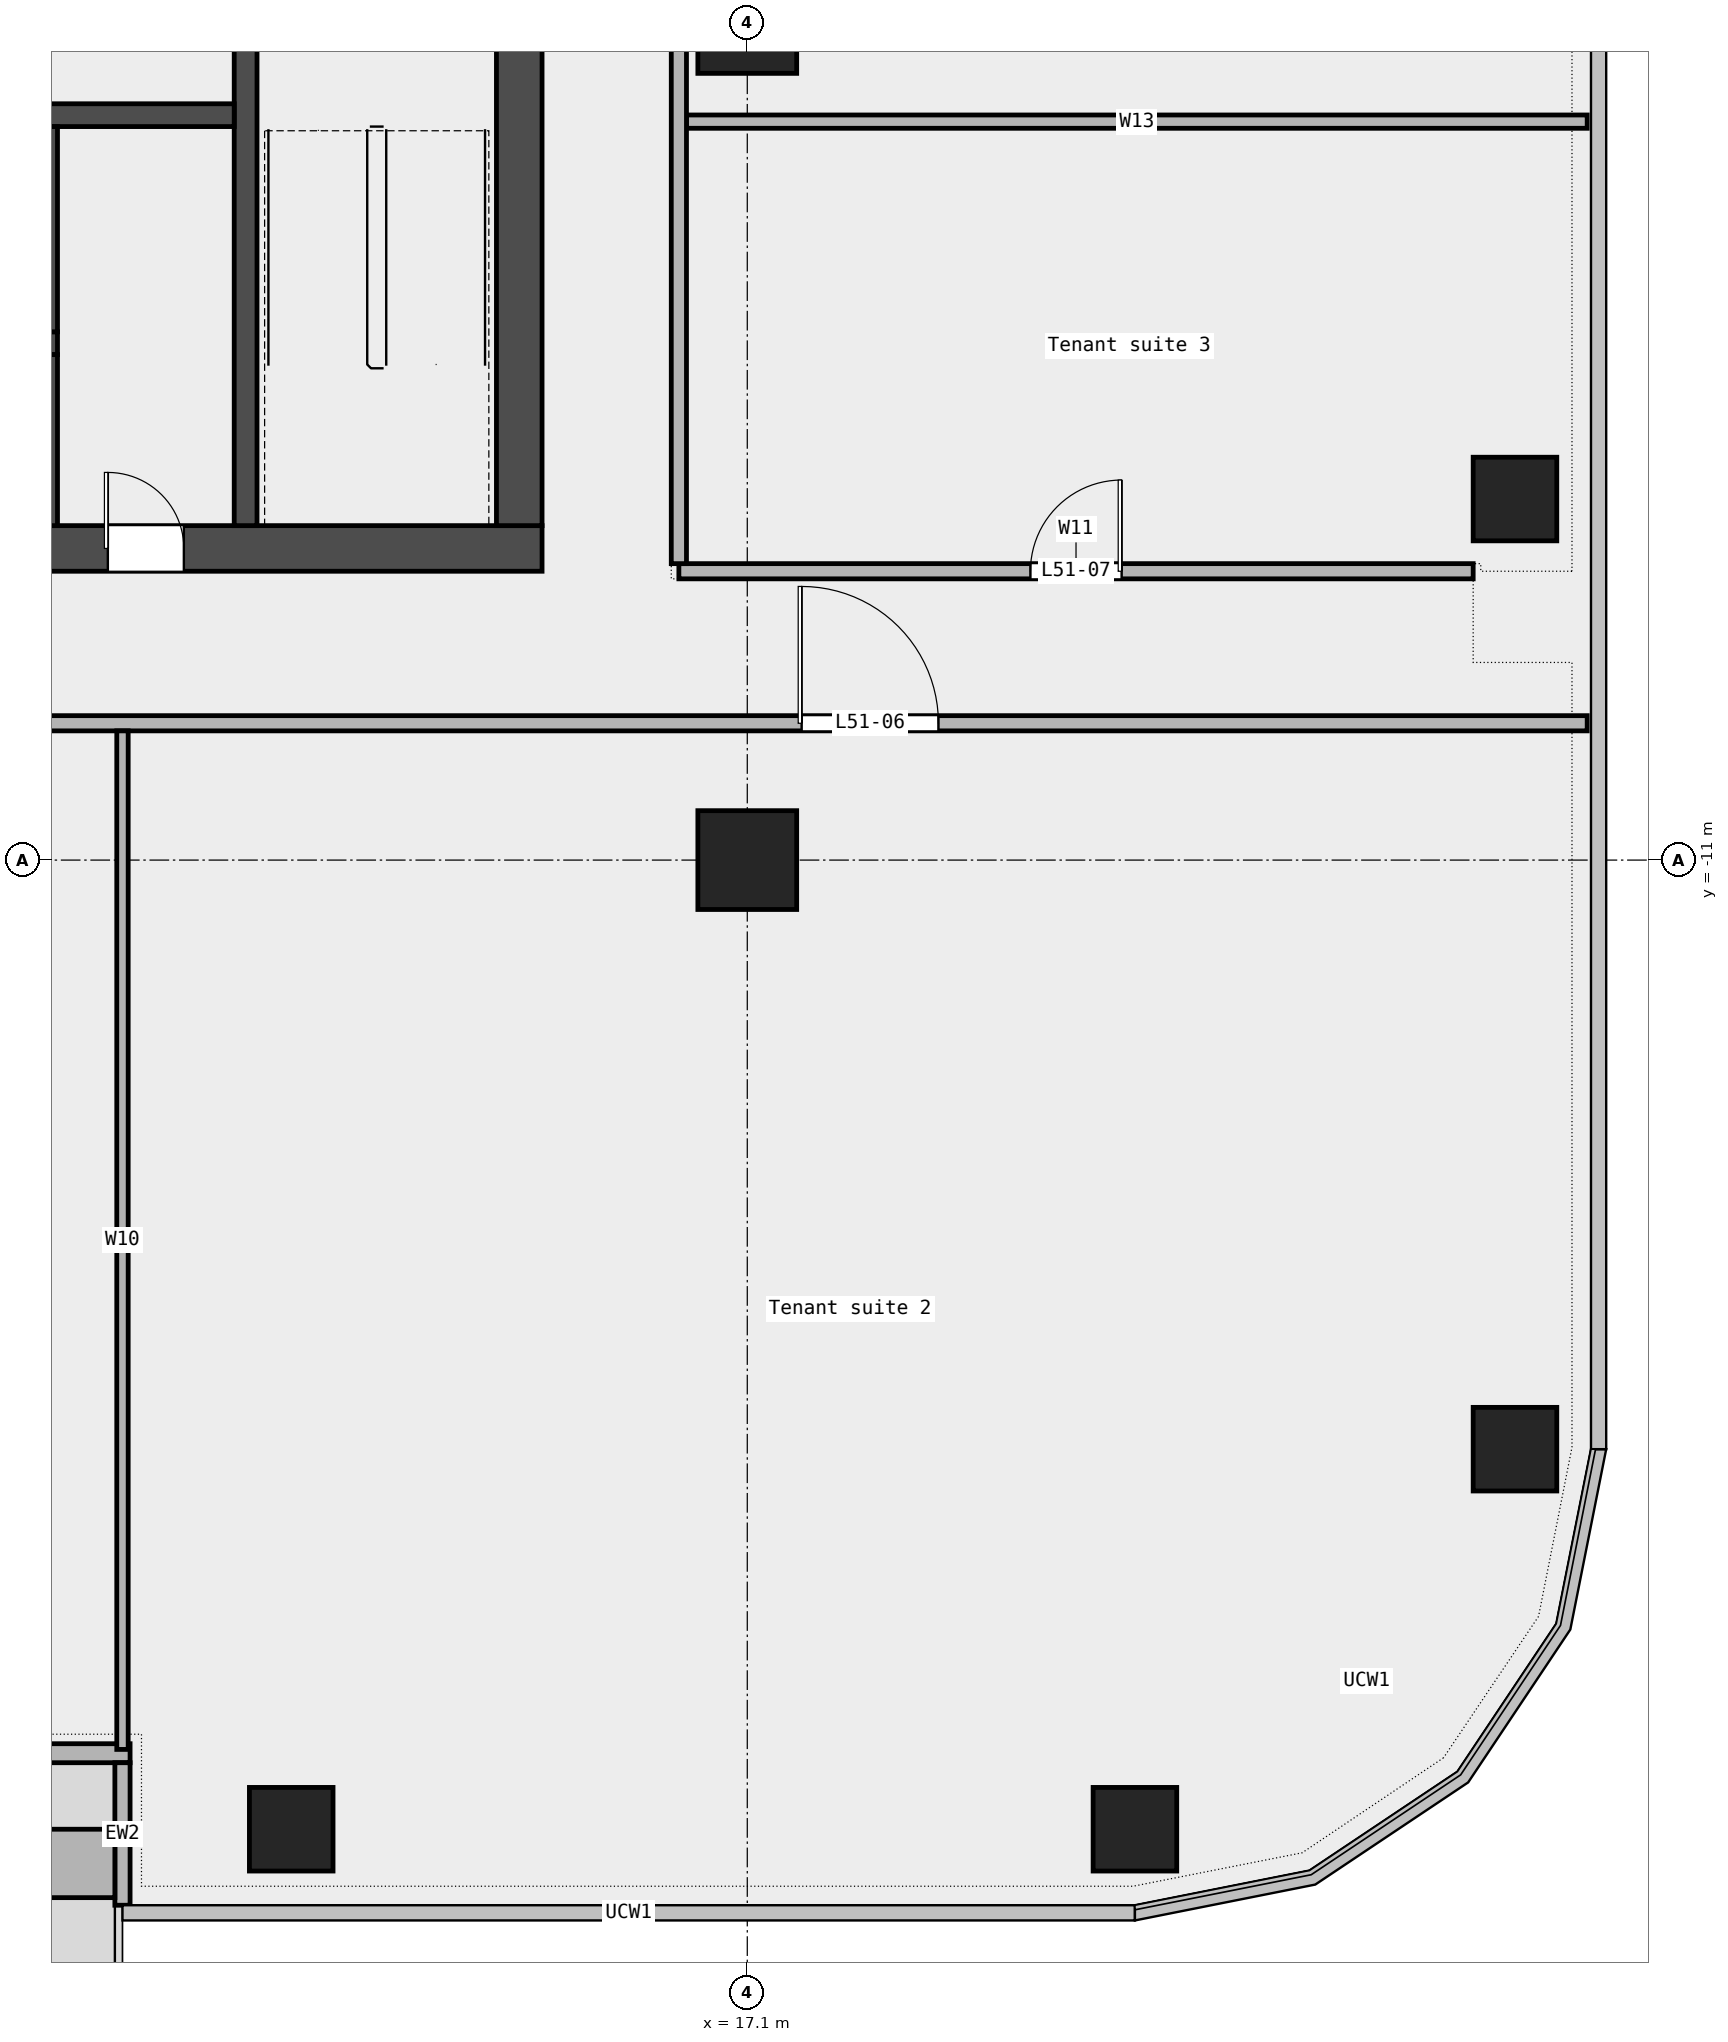
"""IFC4 building model, lengths in metres.
Left out: names, types, materials, properties, quantities, classifications, styles, units other than length and angle.
Written with IfcOpenShell. Run it as: python <this file> out.ifc"""

import sys

from ifc_helpers import new_model, si_unit, direction, frame, frame_2d, origin, origin_2d, place, context, subcontext, project, spatial, rectangle, extrude, element, fill, save


model = new_model("IFC4")
c1 = context("Model", 3, precision=1e-05, world=origin(), true_north=direction((0.0, 1.0)))
c2 = subcontext(c1, "Body", "Model", "MODEL_VIEW")
j1 = project(units=[si_unit("LENGTHUNIT", "METRE"), si_unit("PLANEANGLEUNIT", "RADIAN")], contexts=[c1])
p1 = place(None, origin())
s1 = spatial("IfcSite", under=j1, at=p1, CompositionType="ELEMENT")
p2 = place(p1, origin())
s2 = spatial("IfcBuilding", under=s1, at=p2, CompositionType="ELEMENT")
p3 = place(p2, frame((0.0, 0.0, 239.0)))
s3 = spatial("IfcBuildingStorey", under=s2, at=p3, CompositionType="ELEMENT", Elevation=239.0)
for number, where, z_axis, x_axis in (
    (1, (11.1, -23.75, 0.0), (0.0, 0.0, 1.0), (1.0, 0.0, 0.0)),
    (2, (22.2, -23.75, 0.0), (0.0, 0.0, 1.0), (1.0, 0.0, 0.0)),
    (3, (27.2, -18.75, 0.0), (0.0, 0.0, 1.0), (1.0, 0.0, 0.0)),
    (4, (27.2, -6.25, 0.0), (0.0, 0.0, 1.0), (1.0, 0.0, 0.0)),
):
    element("IfcColumn", number, at=place(p3, frame(where, z_axis=z_axis, x_axis=x_axis)), inside=s3, PredefinedType="COLUMN", context=c2, shape_type="SweptSolid", body=[
        extrude(rectangle(XDim=1.1, YDim=1.1, at=origin_2d()), origin(), (0.0, 0.0, 1.0), 3.6),
    ])
for number, where, z_axis, x_axis in (
    (5, (17.1, -11.0, 0.0), (0.0, 0.0, 1.0), (1.0, 0.0, 0.0)),
    (6, (17.1, 0.0, 0.0), (0.0, 0.0, 1.0), (1.0, 0.0, 0.0)),
):
    element("IfcColumn", number, at=place(p3, frame(where, z_axis=z_axis, x_axis=x_axis)), inside=s3, PredefinedType="COLUMN", context=c2, shape_type="SweptSolid", body=[
        extrude(rectangle(XDim=1.3, YDim=1.3, at=origin_2d()), origin(), (0.0, 0.0, 1.0), 3.6),
    ])
p4 = place(p3, frame((-4.54, -22.75, 0.0), z_axis=(0.0, 0.0, 1.0), x_axis=(1.0, 0.0, 0.0)))
e7 = element("IfcWall", 7, at=p4, inside=s3, PredefinedType="STANDARD", context=c2, shape_type="SweptSolid", body=[
    extrude(rectangle(XDim=13.52, YDim=0.25, at=frame_2d((6.76, 0.0))), origin(), (0.0, 0.0, 1.0), 3.6),
])
p5 = place(p4, frame((1.5, 0.0, 0.45)))
e8 = element("IfcOpeningElement", 8, at=p5, cuts=e7, PredefinedType="OPENING", context=c2, shape_type="SweptSolid", body=[
    extrude(rectangle(XDim=1.5, YDim=2.4, at=frame_2d((0.75, 1.2))), frame((0.0, 0.137, 0.0), z_axis=(0.0, -1.0, 0.0), x_axis=(1.0, 0.0, 0.0)), (0.0, 0.0, 1.0), 0.274),
])
p6 = place(p4, frame((5.75, 0.0, 0.0)))
e9 = element("IfcOpeningElement", 9, at=p6, cuts=e7, PredefinedType="OPENING", context=c2, shape_type="SweptSolid", body=[
    extrude(rectangle(XDim=1.8, YDim=2.4, at=frame_2d((0.9, 1.2))), frame((0.0, 0.137, 0.0), z_axis=(0.0, -1.0, 0.0), x_axis=(1.0, 0.0, 0.0)), (0.0, 0.0, 1.0), 0.274),
])
p7 = place(p4, frame((10.5, 0.0, 0.45)))
e10 = element("IfcOpeningElement", 10, at=p7, cuts=e7, PredefinedType="OPENING", context=c2, shape_type="SweptSolid", body=[
    extrude(rectangle(XDim=1.5, YDim=2.4, at=frame_2d((0.75, 1.2))), frame((0.0, 0.137, 0.0), z_axis=(0.0, -1.0, 0.0), x_axis=(1.0, 0.0, 0.0)), (0.0, 0.0, 1.0), 0.274),
])
p8 = place(p3, frame((8.88, -24.75, 0.0), z_axis=(0.0, 0.0, 1.0), x_axis=(0.0, 1.0, 0.0)))
e11 = element("IfcWall", 11, at=p8, inside=s3, PredefinedType="STANDARD", context=c2, shape_type="SweptSolid", body=[
    extrude(rectangle(XDim=1.875, YDim=0.2, at=frame_2d((0.938, 0.0))), origin(), (0.0, 0.0, 1.0), 3.6),
])
p9 = place(p3, frame((5.18, -24.2, 0.0), z_axis=(0.0, 0.0, 1.0), x_axis=(1.0, 0.0, 0.0)))
e12 = element("IfcWall", 12, at=p9, inside=s3, PredefinedType="STANDARD", context=c2, shape_type="SweptSolid", body=[
    extrude(rectangle(XDim=3.6, YDim=0.9, at=frame_2d((1.8, 0.0))), origin(), (0.0, 0.0, 1.0), 0.7),
])
p10 = place(p3, frame((-28.15, -9.2, 0.0), z_axis=(0.0, 0.0, 1.0), x_axis=(1.0, 0.0, 0.0)))
e13 = element("IfcWall", 13, at=p10, inside=s3, PredefinedType="PARTITIONING", context=c2, shape_type="SweptSolid", body=[
    extrude(rectangle(XDim=56.3, YDim=0.2, at=frame_2d((28.15, 0.0))), origin(), (0.0, 0.0, 1.0), 3.6),
])
p11 = place(p10, frame((29.47, 0.0, 0.0)))
e14 = element("IfcOpeningElement", 14, at=p11, cuts=e13, PredefinedType="OPENING", context=c2, shape_type="SweptSolid", body=[
    extrude(rectangle(XDim=1.8, YDim=2.1, at=frame_2d((0.9, 1.05))), frame((0.0, 0.112, 0.0), z_axis=(0.0, -1.0, 0.0), x_axis=(1.0, 0.0, 0.0)), (0.0, 0.0, 1.0), 0.224),
])
p12 = place(p10, frame((45.965, 0.0, 0.0)))
e15 = element("IfcOpeningElement", 15, at=p12, cuts=e13, PredefinedType="OPENING", context=c2, shape_type="SweptSolid", body=[
    extrude(rectangle(XDim=1.8, YDim=2.1, at=frame_2d((0.9, 1.05))), frame((0.0, 0.112, 0.0), z_axis=(0.0, -1.0, 0.0), x_axis=(1.0, 0.0, 0.0)), (0.0, 0.0, 1.0), 0.224),
])
p13 = place(p10, frame((11.955, 0.0, 0.0)))
e16 = element("IfcOpeningElement", 16, at=p13, cuts=e13, PredefinedType="OPENING", context=c2, shape_type="SweptSolid", body=[
    extrude(rectangle(XDim=1.8, YDim=2.1, at=frame_2d((0.9, 1.05))), frame((0.0, 0.112, 0.0), z_axis=(0.0, -1.0, 0.0), x_axis=(1.0, 0.0, 0.0)), (0.0, 0.0, 1.0), 0.224),
])
p14 = place(p3, frame((16.2, -7.2, 0.0), z_axis=(0.0, 0.0, 1.0), x_axis=(1.0, 0.0, 0.0)))
e17 = element("IfcWall", 17, at=p14, inside=s3, PredefinedType="PARTITIONING", context=c2, shape_type="SweptSolid", body=[
    extrude(rectangle(XDim=10.45, YDim=0.2, at=frame_2d((5.225, 0.0))), origin(), (0.0, 0.0, 1.0), 3.6),
])
p15 = place(p14, frame((4.625, 0.0, 0.0)))
e18 = element("IfcOpeningElement", 18, at=p15, cuts=e17, PredefinedType="OPENING", context=c2, shape_type="SweptSolid", body=[
    extrude(rectangle(XDim=1.2, YDim=2.1, at=frame_2d((0.6, 1.05))), frame((0.0, 0.112, 0.0), z_axis=(0.0, -1.0, 0.0), x_axis=(1.0, 0.0, 0.0)), (0.0, 0.0, 1.0), 0.224),
])
p16 = place(p3, frame((16.3, -1.285, 0.0), z_axis=(0.0, 0.0, 1.0), x_axis=(1.0, 0.0, 0.0)))
e19 = element("IfcWall", 19, at=p16, inside=s3, PredefinedType="PARTITIONING", context=c2, shape_type="SweptSolid", body=[
    extrude(rectangle(XDim=11.85, YDim=0.175, at=frame_2d((5.925, 0.0))), origin(), (0.0, 0.0, 1.0), 3.6),
])
p17 = place(p3, frame((8.88, -22.7, 0.0), z_axis=(0.0, 0.0, 1.0), x_axis=(0.0, 1.0, 0.0)))
e20 = element("IfcWall", 20, at=p17, inside=s3, PredefinedType="PARTITIONING", context=c2, shape_type="SweptSolid", body=[
    extrude(rectangle(XDim=13.4, YDim=0.15, at=frame_2d((6.7, 0.0))), origin(), (0.0, 0.0, 1.0), 3.6),
])
p18 = place(p3, frame((16.2, -7.1, 0.0), z_axis=(0.0, 0.0, 1.0), x_axis=(0.0, 1.0, 0.0)))
e21 = element("IfcWall", 21, at=p18, inside=s3, PredefinedType="PARTITIONING", context=c2, shape_type="SweptSolid", body=[
    extrude(rectangle(XDim=20.5, YDim=0.2, at=frame_2d((10.25, 0.0))), origin(), (0.0, 0.0, 1.0), 3.6),
])
p19 = place(p18, frame((12.258, 0.0, 0.0)))
e22 = element("IfcOpeningElement", 22, at=p19, cuts=e21, PredefinedType="OPENING", context=c2, shape_type="SweptSolid", body=[
    extrude(rectangle(XDim=1.8, YDim=2.1, at=frame_2d((0.9, 1.05))), frame((0.0, 0.112, 0.0), z_axis=(0.0, -1.0, 0.0), x_axis=(1.0, 0.0, 0.0)), (0.0, 0.0, 1.0), 0.224),
])
p20 = place(p3, frame((-14.4, -6.9, 0.0), z_axis=(0.0, 0.0, 1.0), x_axis=(1.0, 0.0, 0.0)))
e23 = element("IfcWall", 23, at=p20, inside=s3, PredefinedType="SHEAR", context=c2, shape_type="SweptSolid", body=[
    extrude(rectangle(XDim=28.8, YDim=0.6, at=frame_2d((14.4, 0.0))), origin(), (0.0, 0.0, 1.0), 3.7),
])
p21 = place(p20, frame((4.337, 0.0, 0.0)))
e24 = element("IfcOpeningElement", 24, at=p21, cuts=e23, PredefinedType="OPENING", context=c2, shape_type="SweptSolid", body=[
    extrude(rectangle(XDim=1.0, YDim=2.1, at=frame_2d((0.5, 1.05))), frame((0.0, 0.312, 0.0), z_axis=(0.0, -1.0, 0.0), x_axis=(1.0, 0.0, 0.0)), (0.0, 0.0, 1.0), 0.624),
])
p22 = place(p20, frame((8.55, 0.0, 0.0)))
e25 = element("IfcOpeningElement", 25, at=p22, cuts=e23, PredefinedType="OPENING", context=c2, shape_type="SweptSolid", body=[
    extrude(rectangle(XDim=1.2, YDim=2.1, at=frame_2d((0.6, 1.05))), frame((0.0, 0.312, 0.0), z_axis=(0.0, -1.0, 0.0), x_axis=(1.0, 0.0, 0.0)), (0.0, 0.0, 1.0), 0.624),
])
p23 = place(p20, frame((12.962, 0.0, 0.0)))
e26 = element("IfcOpeningElement", 26, at=p23, cuts=e23, PredefinedType="OPENING", context=c2, shape_type="SweptSolid", body=[
    extrude(rectangle(XDim=1.0, YDim=2.1, at=frame_2d((0.5, 1.05))), frame((0.0, 0.312, 0.0), z_axis=(0.0, -1.0, 0.0), x_axis=(1.0, 0.0, 0.0)), (0.0, 0.0, 1.0), 0.624),
])
p24 = place(p20, frame((15.212, 0.0, 0.0)))
e27 = element("IfcOpeningElement", 27, at=p24, cuts=e23, PredefinedType="OPENING", context=c2, shape_type="SweptSolid", body=[
    extrude(rectangle(XDim=1.0, YDim=2.1, at=frame_2d((0.5, 1.05))), frame((0.0, 0.312, 0.0), z_axis=(0.0, -1.0, 0.0), x_axis=(1.0, 0.0, 0.0)), (0.0, 0.0, 1.0), 0.624),
])
p25 = place(p20, frame((18.75, 0.0, 0.0)))
e28 = element("IfcOpeningElement", 28, at=p25, cuts=e23, PredefinedType="OPENING", context=c2, shape_type="SweptSolid", body=[
    extrude(rectangle(XDim=1.8, YDim=2.1, at=frame_2d((0.9, 1.05))), frame((0.0, 0.312, 0.0), z_axis=(0.0, -1.0, 0.0), x_axis=(1.0, 0.0, 0.0)), (0.0, 0.0, 1.0), 0.624),
])
p26 = place(p20, frame((23.087, 0.0, 0.0)))
e29 = element("IfcOpeningElement", 29, at=p26, cuts=e23, PredefinedType="OPENING", context=c2, shape_type="SweptSolid", body=[
    extrude(rectangle(XDim=1.0, YDim=2.1, at=frame_2d((0.5, 1.05))), frame((0.0, 0.312, 0.0), z_axis=(0.0, -1.0, 0.0), x_axis=(1.0, 0.0, 0.0)), (0.0, 0.0, 1.0), 0.624),
])
p27 = place(p3, frame((14.1, -6.6, 0.0), z_axis=(0.0, 0.0, 1.0), x_axis=(0.0, 1.0, 0.0)))
e30 = element("IfcWall", 30, at=p27, inside=s3, PredefinedType="SHEAR", context=c2, shape_type="SweptSolid", body=[
    extrude(rectangle(XDim=19.5, YDim=0.6, at=frame_2d((9.75, 0.0))), origin(), (0.0, 0.0, 1.0), 3.7),
])
p28 = place(p27, frame((9.3, 0.0, 0.0)))
e31 = element("IfcOpeningElement", 31, at=p28, cuts=e30, PredefinedType="OPENING", context=c2, shape_type="SweptSolid", body=[
    extrude(rectangle(XDim=1.8, YDim=2.1, at=frame_2d((0.9, 1.05))), frame((0.0, 0.312, 0.0), z_axis=(0.0, -1.0, 0.0), x_axis=(1.0, 0.0, 0.0)), (0.0, 0.0, 1.0), 0.624),
])
p29 = place(p3, frame((10.5, -6.6, 0.0), z_axis=(0.0, 0.0, 1.0), x_axis=(0.0, 1.0, 0.0)))
e32 = element("IfcWall", 32, at=p29, inside=s3, PredefinedType="SHEAR", context=c2, shape_type="SweptSolid", body=[
    extrude(rectangle(XDim=8.55, YDim=0.3, at=frame_2d((4.275, 0.0))), origin(), (0.0, 0.0, 1.0), 3.7),
])
p30 = place(p3, frame((-10.35, -1.2, 0.0), z_axis=(0.0, 0.0, 1.0), x_axis=(1.0, 0.0, 0.0)))
e33 = element("IfcWall", 33, at=p30, inside=s3, PredefinedType="SOLIDWALL", context=c2, shape_type="SweptSolid", body=[
    extrude(rectangle(XDim=20.7, YDim=0.3, at=frame_2d((10.35, 0.0))), origin(), (0.0, 0.0, 1.0), 3.7),
])
p31 = place(p3, frame((2.475, -4.2, 0.0), z_axis=(0.0, 0.0, 1.0), x_axis=(1.0, 0.0, 0.0)))
e34 = element("IfcWall", 34, at=p31, inside=s3, PredefinedType="SOLIDWALL", context=c2, shape_type="SweptSolid", body=[
    extrude(rectangle(XDim=5.55, YDim=0.3, at=frame_2d((2.775, 0.0))), origin(), (0.0, 0.0, 1.0), 3.7),
])
p32 = place(p31, frame((0.762, 0.0, 0.0)))
e35 = element("IfcOpeningElement", 35, at=p32, cuts=e34, PredefinedType="OPENING", context=c2, shape_type="SweptSolid", body=[
    extrude(rectangle(XDim=1.4, YDim=2.1, at=frame_2d((0.7, 1.05))), frame((0.0, 0.162, 0.0), z_axis=(0.0, -1.0, 0.0), x_axis=(1.0, 0.0, 0.0)), (0.0, 0.0, 1.0), 0.324),
])
p33 = place(p31, frame((3.387, 0.0, 0.0)))
e36 = element("IfcOpeningElement", 36, at=p33, cuts=e34, PredefinedType="OPENING", context=c2, shape_type="SweptSolid", body=[
    extrude(rectangle(XDim=1.4, YDim=2.1, at=frame_2d((0.7, 1.05))), frame((0.0, 0.162, 0.0), z_axis=(0.0, -1.0, 0.0), x_axis=(1.0, 0.0, 0.0)), (0.0, 0.0, 1.0), 0.324),
])
p34 = place(p3, frame((7.875, -4.05, 0.0), z_axis=(0.0, 0.0, 1.0), x_axis=(0.0, 1.0, 0.0)))
e37 = element("IfcWall", 37, at=p34, inside=s3, PredefinedType="SOLIDWALL", context=c2, shape_type="SweptSolid", body=[
    extrude(rectangle(XDim=2.7, YDim=0.3, at=frame_2d((1.35, 0.0))), origin(), (0.0, 0.0, 1.0), 3.7),
])
p35 = place(p3, frame((7.875, -6.6, 0.0), z_axis=(0.0, 0.0, 1.0), x_axis=(0.0, 1.0, 0.0)))
e38 = element("IfcWall", 38, at=p35, inside=s3, PredefinedType="SOLIDWALL", context=c2, shape_type="SweptSolid", body=[
    extrude(rectangle(XDim=2.25, YDim=0.3, at=frame_2d((1.125, 0.0))), origin(), (0.0, 0.0, 1.0), 3.7),
])
p36 = place(p12, origin())
e39 = element("IfcDoor", 39, at=p36, inside=s3, OperationType="DOUBLE_DOOR_SINGLE_SWING", PredefinedType="DOOR", context=c2, shape_type="SweptSolid", body=[
    extrude(rectangle(XDim=1.8, YDim=2.1, at=frame_2d((0.9, 1.05))), frame((0.0, 0.025, 0.0), z_axis=(0.0, -1.0, 0.0), x_axis=(1.0, 0.0, 0.0)), (0.0, 0.0, 1.0), 0.05),
])
fill(e15, e39)
p37 = place(p15, origin())
e40 = element("IfcDoor", 40, at=p37, inside=s3, OperationType="SINGLE_SWING_RIGHT", PredefinedType="DOOR", context=c2, shape_type="SweptSolid", body=[
    extrude(rectangle(XDim=1.2, YDim=2.1, at=frame_2d((0.6, 1.05))), frame((0.0, 0.025, 0.0), z_axis=(0.0, -1.0, 0.0), x_axis=(1.0, 0.0, 0.0)), (0.0, 0.0, 1.0), 0.05),
])
fill(e18, e40)
p38 = place(p26, origin())
e41 = element("IfcDoor", 41, at=p38, inside=s3, OperationType="SINGLE_SWING_LEFT", PredefinedType="DOOR", context=c2, shape_type="SweptSolid", body=[
    extrude(rectangle(XDim=1.0, YDim=2.1, at=frame_2d((0.5, 1.05))), frame((0.0, 0.025, 0.0), z_axis=(0.0, -1.0, 0.0), x_axis=(1.0, 0.0, 0.0)), (0.0, 0.0, 1.0), 0.05),
])
fill(e29, e41)
save(model, sys.argv[1])
